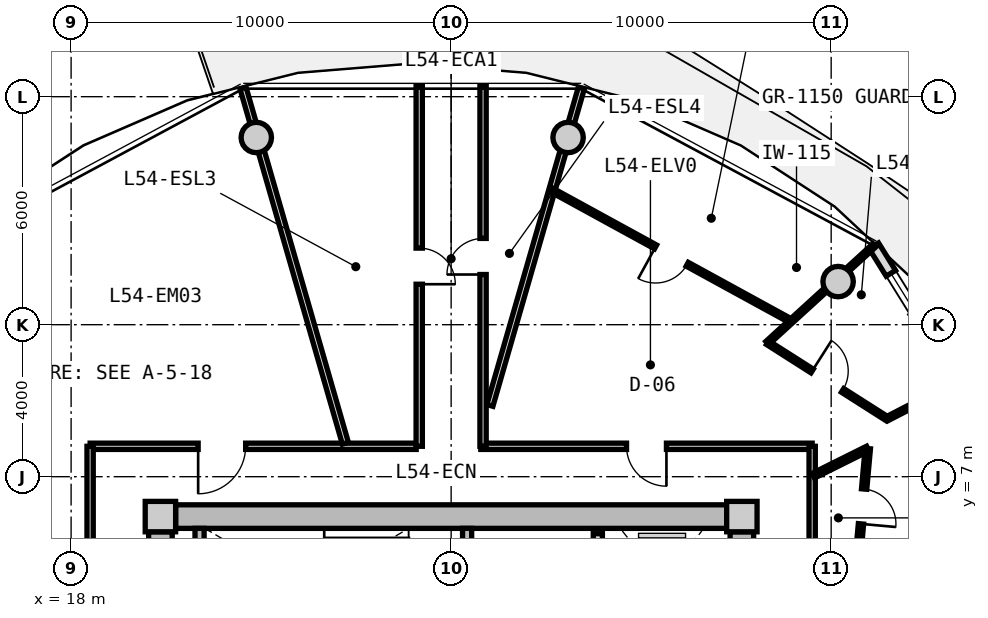
"""IFC4 building model, lengths in metres.
Left out: names, types, materials, properties, quantities, classifications, styles, units other than length and angle.
Written with IfcOpenShell. Run it as: python <this file> out.ifc"""

import sys

from ifc_helpers import new_model, si_unit, direction, frame, frame_2d, origin, origin_2d, place, context, subcontext, project, spatial, rectangle, circle, extrude, source, transform, mapped, element, fill, save


model = new_model("IFC4")
c1 = context("Model", 3, precision=1e-05, world=origin(), true_north=direction((0.0, 1.0)))
c2 = subcontext(c1, "Body", "Model", "MODEL_VIEW")
j1 = project(units=[si_unit("LENGTHUNIT", "METRE"), si_unit("PLANEANGLEUNIT", "RADIAN")], contexts=[c1])
p1 = place(None, origin())
s1 = spatial("IfcSite", under=j1, at=p1, CompositionType="ELEMENT")
p2 = place(p1, origin())
s2 = spatial("IfcBuilding", under=s1, at=p2, CompositionType="ELEMENT")
p3 = place(p2, frame((0.0, 0.0, 173.95)))
s3 = spatial("IfcBuildingStorey", under=s2, at=p3, CompositionType="ELEMENT", Elevation=173.95)
m1 = source(origin(), c2, "Body", "SweptSolid", [
    extrude(rectangle(XDim=0.8, YDim=0.8, at=origin_2d()), origin(), (0.0, 0.0, 1.0), 3.05),
])
for number, where, z_axis, x_axis in (
    (1, (35.65, 5.95, 0.0), (0.0, 0.0, 1.0), (1.0, 0.0, 0.0)),
    (2, (20.35, 5.95, 0.0), (0.0, 0.0, 1.0), (1.0, 0.0, 0.0)),
):
    element("IfcColumn", number, at=place(p3, frame(where, z_axis=z_axis, x_axis=x_axis)), inside=s3, PredefinedType="COLUMN", context=c2, shape_type="MappedRepresentation", body=[
        mapped(m1, transform((0.0, 0.0, 0.0), x_axis=(1.0, 0.0, 0.0), y_axis=(0.0, 1.0, 0.0), z_axis=(0.0, 0.0, 1.0), scale=1.0)),
    ])
m2 = source(origin(), c2, "Body", "SweptSolid", [
    extrude(rectangle(XDim=14.5, YDim=0.62, at=frame_2d((7.25, 0.0))), origin(), (0.0, 0.0, 1.0), 2.81),
])
p4 = place(p3, frame((20.75, 5.95, 0.0), z_axis=(0.0, 0.0, 1.0), x_axis=(1.0, 0.0, 0.0)))
e3 = element("IfcWall", 3, at=p4, inside=s3, PredefinedType="SHEAR", context=c2, shape_type="MappedRepresentation", body=[
    mapped(m2, transform((0.0, 0.0, 0.0), x_axis=(1.0, 0.0, 0.0), y_axis=(0.0, 1.0, 0.0), z_axis=(0.0, 0.0, 1.0), scale=1.0)),
])
m3 = source(origin(), c2, "Body", "SweptSolid", [
    extrude(rectangle(XDim=11.1, YDim=0.62, at=frame_2d((5.55, 0.0))), origin(), (0.0, 0.0, 1.0), 2.81),
])
p5 = place(p3, frame((20.35, -5.55, 0.0), z_axis=(0.0, 0.0, 1.0), x_axis=(0.0, 1.0, 0.0)))
e4 = element("IfcWall", 4, at=p5, inside=s3, PredefinedType="SHEAR", context=c2, shape_type="MappedRepresentation", body=[
    mapped(m3, transform((0.0, 0.0, 0.0), x_axis=(1.0, 0.0, 0.0), y_axis=(0.0, 1.0, 0.0), z_axis=(0.0, 0.0, 1.0), scale=1.0)),
])
p6 = place(p5, frame((3.8, 0.0, 0.0)))
e5 = element("IfcOpeningElement", 5, at=p6, cuts=e4, PredefinedType="OPENING", context=c2, shape_type="SweptSolid", body=[
    extrude(rectangle(XDim=1.2, YDim=2.15, at=frame_2d((0.6, 1.075))), frame((0.0, 0.32, 0.0), z_axis=(0.0, -1.0, 0.0), x_axis=(1.0, 0.0, 0.0)), (0.0, 0.0, 1.0), 0.64),
])
p7 = place(p3, frame((35.65, 5.55, 0.0), z_axis=(0.0, 0.0, 1.0), x_axis=(0.0, -1.0, 0.0)))
e6 = element("IfcWall", 6, at=p7, inside=s3, PredefinedType="SHEAR", context=c2, shape_type="MappedRepresentation", body=[
    mapped(m3, transform((0.0, 0.0, 0.0), x_axis=(1.0, 0.0, 0.0), y_axis=(0.0, 1.0, 0.0), z_axis=(0.0, 0.0, 1.0), scale=1.0)),
])
p8 = place(p7, frame((5.65, 0.0, 0.0)))
e7 = element("IfcOpeningElement", 7, at=p8, cuts=e6, PredefinedType="OPENING", context=c2, shape_type="SweptSolid", body=[
    extrude(rectangle(XDim=1.2, YDim=2.15, at=frame_2d((0.6, 1.075))), frame((0.0, 0.32, 0.0), z_axis=(0.0, -1.0, 0.0), x_axis=(1.0, 0.0, 0.0)), (0.0, 0.0, 1.0), 0.64),
])
m4 = source(origin(), c2, "Body", "SweptSolid", [
    extrude(circle(Radius=0.4, at=origin_2d()), origin(), (0.0, 0.0, 1.0), 3.05),
])
for number, where, z_axis, x_axis in (
    (8, (38.183, 12.135, 0.0), (0.0, 0.0, 1.0), (1.0, 0.0, 0.0)),
    (9, (31.077, 15.926, 0.0), (0.0, 0.0, 1.0), (1.0, 0.0, 0.0)),
    (10, (22.873, 15.926, 0.0), (0.0, 0.0, 1.0), (1.0, 0.0, 0.0)),
):
    element("IfcColumn", number, at=place(p3, frame(where, z_axis=z_axis, x_axis=x_axis)), inside=s3, PredefinedType="COLUMN", context=c2, shape_type="MappedRepresentation", body=[
        mapped(m4, transform((0.0, 0.0, 0.0), x_axis=(1.0, 0.0, 0.0), y_axis=(0.0, 1.0, 0.0), z_axis=(0.0, 0.0, 1.0), scale=1.0)),
    ])
m5 = source(origin(), c2, "Body", "SweptSolid", [
    extrude(rectangle(XDim=8.431, YDim=0.29, at=frame_2d((4.216, 0.0))), origin(), (0.0, 0.0, 1.0), 2.81),
])
p9 = place(p3, frame((39.123, 13.075, 0.0), z_axis=(0.0, 0.0, 1.0), x_axis=(0.527377998418, -0.849630770855, 0.0)))
e11 = element("IfcWall", 11, at=p9, inside=s3, PredefinedType="SOLIDWALL", context=c2, shape_type="MappedRepresentation", body=[
    mapped(m5, transform((0.0, 0.0, 0.0), x_axis=(1.0, 0.0, 0.0), y_axis=(0.0, 1.0, 0.0), z_axis=(0.0, 0.0, 1.0), scale=1.0)),
])
p10 = place(p9, frame((6.34, 0.0, 0.0)))
e12 = element("IfcOpeningElement", 12, at=p10, cuts=e11, PredefinedType="OPENING", context=c2, shape_type="SweptSolid", body=[
    extrude(rectangle(XDim=1.15, YDim=2.25, at=frame_2d((0.575, 1.125))), frame((0.0, 0.155, 0.0), z_axis=(0.0, -1.0, 0.0), x_axis=(1.0, 0.0, 0.0)), (0.0, 0.0, 1.0), 0.31),
])
p11 = place(p9, frame((0.85, 0.0, 0.85)))
e13 = element("IfcOpeningElement", 13, at=p11, cuts=e11, PredefinedType="OPENING", context=c2, shape_type="SweptSolid", body=[
    extrude(rectangle(XDim=1.2, YDim=1.5, at=frame_2d((0.6, 0.75))), frame((0.0, 0.155, 0.0), z_axis=(0.0, -1.0, 0.0), x_axis=(1.0, 0.0, 0.0)), (0.0, 0.0, 1.0), 0.31),
])
m6 = source(origin(), c2, "Body", "SweptSolid", [
    extrude(rectangle(XDim=3.19, YDim=0.24, at=frame_2d((1.595, 0.0))), origin(), (0.0, 0.0, 1.0), 2.81),
])
p12 = place(p3, frame((21.38, 2.45, 0.0), z_axis=(0.0, 0.0, 1.0), x_axis=(0.0, 1.0, 0.0)))
e14 = element("IfcWall", 14, at=p12, inside=s3, PredefinedType="PARTITIONING", context=c2, shape_type="MappedRepresentation", body=[
    mapped(m6, transform((0.0, 0.0, 0.0), x_axis=(1.0, 0.0, 0.0), y_axis=(0.0, 1.0, 0.0), z_axis=(0.0, 0.0, 1.0), scale=1.0)),
])
p13 = place(p3, frame((28.42, 2.45, 0.0), z_axis=(0.0, 0.0, 1.0), x_axis=(0.0, 1.0, 0.0)))
e15 = element("IfcWall", 15, at=p13, inside=s3, PredefinedType="PARTITIONING", context=c2, shape_type="MappedRepresentation", body=[
    mapped(m6, transform((0.0, 0.0, 0.0), x_axis=(1.0, 0.0, 0.0), y_axis=(0.0, 1.0, 0.0), z_axis=(0.0, 0.0, 1.0), scale=1.0)),
])
p14 = place(p13, frame((0.55, 0.0, 0.0)))
e16 = element("IfcOpeningElement", 16, at=p14, cuts=e15, PredefinedType="OPENING", context=c2, shape_type="SweptSolid", body=[
    extrude(rectangle(XDim=1.1, YDim=2.15, at=frame_2d((0.55, 1.075))), frame((0.0, 0.13, 0.0), z_axis=(0.0, -1.0, 0.0), x_axis=(1.0, 0.0, 0.0)), (0.0, 0.0, 1.0), 0.26),
])
m7 = source(origin(), c2, "Body", "SweptSolid", [
    extrude(rectangle(XDim=5.0, YDim=0.24, at=frame_2d((2.5, 0.0))), origin(), (0.0, 0.0, 1.0), 2.795),
])
p15 = place(p3, frame((31.86, 0.5, 0.0), z_axis=(0.0, 0.0, 1.0), x_axis=(0.0, 1.0, 0.0)))
e17 = element("IfcWall", 17, at=p15, inside=s3, PredefinedType="PARTITIONING", context=c2, shape_type="MappedRepresentation", body=[
    mapped(m7, transform((0.0, 0.0, 0.0), x_axis=(1.0, 0.0, 0.0), y_axis=(0.0, 1.0, 0.0), z_axis=(0.0, 0.0, 1.0), scale=1.0)),
])
p16 = place(p15, frame((3.05, 0.0, 0.0)))
e18 = element("IfcOpeningElement", 18, at=p16, cuts=e17, PredefinedType="OPENING", context=c2, shape_type="SweptSolid", body=[
    extrude(rectangle(XDim=1.3, YDim=2.2, at=frame_2d((0.65, 1.1))), frame((0.0, 0.13, 0.0), z_axis=(0.0, -1.0, 0.0), x_axis=(1.0, 0.0, 0.0)), (0.0, 0.0, 1.0), 0.26),
])
p17 = place(p15, frame((0.55, 0.0, 0.0)))
e19 = element("IfcOpeningElement", 19, at=p17, cuts=e17, PredefinedType="OPENING", context=c2, shape_type="SweptSolid", body=[
    extrude(rectangle(XDim=1.3, YDim=2.2, at=frame_2d((0.65, 1.1))), frame((0.0, 0.13, 0.0), z_axis=(0.0, -1.0, 0.0), x_axis=(1.0, 0.0, 0.0)), (0.0, 0.0, 1.0), 0.26),
])
m8 = source(origin(), c2, "Body", "SweptSolid", [
    extrude(rectangle(XDim=8.58, YDim=0.165, at=frame_2d((4.29, 0.0))), origin(), (0.0, 0.0, 1.0), 2.795),
])
p18 = place(p3, frame((18.5, 7.8, 0.0), z_axis=(0.0, 0.0, 1.0), x_axis=(1.0, 0.0, 0.0)))
e20 = element("IfcWall", 20, at=p18, inside=s3, PredefinedType="PARTITIONING", context=c2, shape_type="MappedRepresentation", body=[
    mapped(m8, transform((0.0, 0.0, 0.0), x_axis=(1.0, 0.0, 0.0), y_axis=(0.0, 1.0, 0.0), z_axis=(0.0, 0.0, 1.0), scale=1.0)),
])
p19 = place(p18, frame((2.843, 0.0, 0.0)))
e21 = element("IfcOpeningElement", 21, at=p19, cuts=e20, PredefinedType="OPENING", context=c2, shape_type="SweptSolid", body=[
    extrude(rectangle(XDim=1.25, YDim=2.2, at=frame_2d((0.625, 1.1))), frame((0.0, 0.093, 0.0), z_axis=(0.0, -1.0, 0.0), x_axis=(1.0, 0.0, 0.0)), (0.0, 0.0, 1.0), 0.185),
])
m9 = source(origin(), c2, "Body", "SweptSolid", [
    extrude(rectangle(XDim=8.719, YDim=0.165, at=frame_2d((4.36, 0.0))), origin(), (0.0, 0.0, 1.0), 2.795),
])
p20 = place(p3, frame((28.781, 7.8, 0.0), z_axis=(0.0, 0.0, 1.0), x_axis=(1.0, 0.0, 0.0)))
e22 = element("IfcWall", 22, at=p20, inside=s3, PredefinedType="PARTITIONING", context=c2, shape_type="MappedRepresentation", body=[
    mapped(m9, transform((0.0, 0.0, 0.0), x_axis=(1.0, 0.0, 0.0), y_axis=(0.0, 1.0, 0.0), z_axis=(0.0, 0.0, 1.0), scale=1.0)),
])
p21 = place(p20, frame((3.835, 0.0, 0.0)))
e23 = element("IfcOpeningElement", 23, at=p21, cuts=e22, PredefinedType="OPENING", context=c2, shape_type="SweptSolid", body=[
    extrude(rectangle(XDim=1.05, YDim=2.15, at=frame_2d((0.525, 1.075))), frame((0.0, 0.093, 0.0), z_axis=(0.0, -1.0, 0.0), x_axis=(1.0, 0.0, 0.0)), (0.0, 0.0, 1.0), 0.185),
])
m10 = source(origin(), c2, "Body", "SweptSolid", [
    extrude(rectangle(XDim=6.88, YDim=0.165, at=frame_2d((3.44, 0.0))), origin(), (0.0, 0.0, 1.0), 2.795),
])
for number, where, z_axis, x_axis in (
    (24, (18.5, 0.92, 0.0), (0.0, 0.0, 1.0), (0.0, 1.0, 0.0)),
    (25, (37.5, 7.8, 0.0), (0.0, 0.0, 1.0), (0.0, -1.0, 0.0)),
):
    element("IfcWall", number, at=place(p3, frame(where, z_axis=z_axis, x_axis=x_axis)), inside=s3, PredefinedType="PARTITIONING", context=c2, shape_type="MappedRepresentation", body=[
        mapped(m10, transform((0.0, 0.0, 0.0), x_axis=(1.0, 0.0, 0.0), y_axis=(0.0, 1.0, 0.0), z_axis=(0.0, 0.0, 1.0), scale=1.0)),
    ])
m11 = source(origin(), c2, "Body", "SweptSolid", [
    extrude(rectangle(XDim=8.695, YDim=0.165, at=frame_2d((4.348, 0.0))), origin(), (0.0, 0.0, 1.0), 2.345),
])
p22 = place(p3, frame((29.02, 8.875, 0.0), z_axis=(0.0, 0.0, 1.0), x_axis=(0.276797231892, 0.960928349263, 0.0)))
e26 = element("IfcWall", 26, at=p22, inside=s3, PredefinedType="PARTITIONING", context=c2, shape_type="MappedRepresentation", body=[
    mapped(m11, transform((0.0, 0.0, 0.0), x_axis=(1.0, 0.0, 0.0), y_axis=(0.0, 1.0, 0.0), z_axis=(0.0, 0.0, 1.0), scale=1.0)),
])
m12 = source(origin(), c2, "Body", "SweptSolid", [
    extrude(rectangle(XDim=9.73, YDim=0.165, at=frame_2d((4.865, 0.0))), origin(), (0.0, 0.0, 1.0), 2.345),
])
p23 = place(p3, frame((25.217, 7.88, 0.0), z_axis=(0.0, 0.0, 1.0), x_axis=(-0.27679492614, 0.960929013436, 0.0)))
e27 = element("IfcWall", 27, at=p23, inside=s3, PredefinedType="PARTITIONING", context=c2, shape_type="MappedRepresentation", body=[
    mapped(m12, transform((0.0, 0.0, 0.0), x_axis=(1.0, 0.0, 0.0), y_axis=(0.0, 1.0, 0.0), z_axis=(0.0, 0.0, 1.0), scale=1.0)),
])
m13 = source(origin(), c2, "Body", "SweptSolid", [
    extrude(rectangle(XDim=8.305, YDim=0.165, at=frame_2d((4.153, 0.0))), origin(), (0.0, 0.0, 1.0), 2.345),
])
p24 = place(p3, frame((18.42, 3.908, 0.0), z_axis=(0.0, 0.0, 1.0), x_axis=(-0.970309994378, 0.241864662175, 0.0)))
e28 = element("IfcWall", 28, at=p24, inside=s3, PredefinedType="PARTITIONING", context=c2, shape_type="MappedRepresentation", body=[
    mapped(m13, transform((0.0, 0.0, 0.0), x_axis=(1.0, 0.0, 0.0), y_axis=(0.0, 1.0, 0.0), z_axis=(0.0, 0.0, 1.0), scale=1.0)),
])
m14 = source(origin(), c2, "Body", "SweptSolid", [
    extrude(rectangle(XDim=6.193, YDim=0.165, at=frame_2d((3.096, 0.0))), origin(), (0.0, 0.0, 1.0), 2.345),
])
p25 = place(p3, frame((37.58, 4.419, 0.0), z_axis=(0.0, 0.0, 1.0), x_axis=(0.970309243466, 0.241867674657, 0.0)))
e29 = element("IfcWall", 29, at=p25, inside=s3, PredefinedType="PARTITIONING", context=c2, shape_type="MappedRepresentation", body=[
    mapped(m14, transform((0.0, 0.0, 0.0), x_axis=(1.0, 0.0, 0.0), y_axis=(0.0, 1.0, 0.0), z_axis=(0.0, 0.0, 1.0), scale=1.0)),
])
m15 = source(origin(), c2, "Body", "SweptSolid", [
    extrude(rectangle(XDim=9.48, YDim=0.165, at=frame_2d((4.74, 0.0))), origin(), (0.0, 0.0, 1.0), 2.795),
])
p26 = place(p3, frame((27.16, 7.8, 0.0), z_axis=(0.0, 0.0, 1.0), x_axis=(0.0, 1.0, 0.0)))
e30 = element("IfcWall", 30, at=p26, inside=s3, PredefinedType="PARTITIONING", context=c2, shape_type="MappedRepresentation", body=[
    mapped(m15, transform((0.0, 0.0, 0.0), x_axis=(1.0, 0.0, 0.0), y_axis=(0.0, 1.0, 0.0), z_axis=(0.0, 0.0, 1.0), scale=1.0)),
])
p27 = place(p26, frame((4.265, 0.0, 0.0)))
e31 = element("IfcOpeningElement", 31, at=p27, cuts=e30, PredefinedType="OPENING", context=c2, shape_type="SweptSolid", body=[
    extrude(rectangle(XDim=0.95, YDim=2.1, at=frame_2d((0.475, 1.05))), frame((0.0, 0.093, 0.0), z_axis=(0.0, -1.0, 0.0), x_axis=(1.0, 0.0, 0.0)), (0.0, 0.0, 1.0), 0.185),
])
p28 = place(p3, frame((28.84, 17.28, 0.0), z_axis=(0.0, 0.0, 1.0), x_axis=(0.0, -1.0, 0.0)))
e32 = element("IfcWall", 32, at=p28, inside=s3, PredefinedType="PARTITIONING", context=c2, shape_type="MappedRepresentation", body=[
    mapped(m15, transform((0.0, 0.0, 0.0), x_axis=(1.0, 0.0, 0.0), y_axis=(0.0, 1.0, 0.0), z_axis=(0.0, 0.0, 1.0), scale=1.0)),
])
p29 = place(p28, frame((4.01, 0.0, 0.0)))
e33 = element("IfcOpeningElement", 33, at=p29, cuts=e32, PredefinedType="OPENING", context=c2, shape_type="SweptSolid", body=[
    extrude(rectangle(XDim=0.95, YDim=2.1, at=frame_2d((0.475, 1.05))), frame((0.0, 0.093, 0.0), z_axis=(0.0, -1.0, 0.0), x_axis=(1.0, 0.0, 0.0)), (0.0, 0.0, 1.0), 0.185),
])
m16 = source(origin(), c2, "Body", "SweptSolid", [
    extrude(rectangle(XDim=7.167, YDim=0.115, at=frame_2d((3.583, 0.0))), origin(), (0.0, 0.0, 1.0), 2.795),
])
p30 = place(p3, frame((36.939, 11.098, 0.0), z_axis=(0.0, 0.0, 1.0), x_axis=(-0.8771628907, 0.480192943699, 0.0)))
e34 = element("IfcWall", 34, at=p30, inside=s3, PredefinedType="PARTITIONING", context=c2, shape_type="MappedRepresentation", body=[
    mapped(m16, transform((0.0, 0.0, 0.0), x_axis=(1.0, 0.0, 0.0), y_axis=(0.0, 1.0, 0.0), z_axis=(0.0, 0.0, 1.0), scale=1.0)),
])
p31 = place(p30, frame((3.108, 0.0, 0.0)))
e35 = element("IfcOpeningElement", 35, at=p31, cuts=e34, PredefinedType="OPENING", context=c2, shape_type="SweptSolid", body=[
    extrude(rectangle(XDim=0.95, YDim=2.1, at=frame_2d((0.475, 1.05))), frame((0.0, 0.067, 0.0), z_axis=(0.0, -1.0, 0.0), x_axis=(1.0, 0.0, 0.0)), (0.0, 0.0, 1.0), 0.135),
])
m17 = source(origin(), c2, "Body", "SweptSolid", [
    extrude(rectangle(XDim=3.814, YDim=0.115, at=frame_2d((1.907, 0.0))), origin(), (0.0, 0.0, 1.0), 2.345),
])
p32 = place(p3, frame((36.319, 10.518, 0.0), z_axis=(0.0, 0.0, 1.0), x_axis=(0.73871962024, 0.674012850524, 0.0)))
e36 = element("IfcWall", 36, at=p32, inside=s3, PredefinedType="PARTITIONING", context=c2, shape_type="MappedRepresentation", body=[
    mapped(m17, transform((0.0, 0.0, 0.0), x_axis=(1.0, 0.0, 0.0), y_axis=(0.0, 1.0, 0.0), z_axis=(0.0, 0.0, 1.0), scale=1.0)),
])
m18 = source(origin(), c2, "Body", "SweptSolid", [
    extrude(rectangle(XDim=1.601, YDim=0.14, at=frame_2d((0.801, 0.0))), origin(), (0.0, 0.0, 1.0), 2.795),
])
p33 = place(p3, frame((37.53, 7.026, 0.0), z_axis=(0.0, 0.0, 1.0), x_axis=(0.895279369592, 0.445505163138, 0.0)))
e37 = element("IfcWall", 37, at=p33, inside=s3, PredefinedType="PARTITIONING", context=c2, shape_type="MappedRepresentation", body=[
    mapped(m18, transform((0.0, 0.0, 0.0), x_axis=(1.0, 0.0, 0.0), y_axis=(0.0, 1.0, 0.0), z_axis=(0.0, 0.0, 1.0), scale=1.0)),
])
m19 = source(origin(), c2, "Body", "SweptSolid", [
    extrude(rectangle(XDim=3.058, YDim=0.14, at=frame_2d((1.529, 0.0))), origin(), (0.0, 0.0, 1.0), 2.795),
])
p34 = place(p3, frame((38.964, 7.74, 0.0), z_axis=(0.0, 0.0, 1.0), x_axis=(-0.090060616512, -0.99593628579, 0.0)))
e38 = element("IfcWall", 38, at=p34, inside=s3, PredefinedType="PARTITIONING", context=c2, shape_type="MappedRepresentation", body=[
    mapped(m19, transform((0.0, 0.0, 0.0), x_axis=(1.0, 0.0, 0.0), y_axis=(0.0, 1.0, 0.0), z_axis=(0.0, 0.0, 1.0), scale=1.0)),
])
p35 = place(p34, frame((1.069, 0.0, 0.0)))
e39 = element("IfcOpeningElement", 39, at=p35, cuts=e38, PredefinedType="OPENING", context=c2, shape_type="SweptSolid", body=[
    extrude(rectangle(XDim=0.92, YDim=2.1, at=frame_2d((0.46, 1.05))), frame((0.0, 0.08, 0.0), z_axis=(0.0, -1.0, 0.0), x_axis=(1.0, 0.0, 0.0)), (0.0, 0.0, 1.0), 0.16),
])
m20 = source(origin(), c2, "Body", "SweptSolid", [
    extrude(rectangle(XDim=2.13, YDim=0.115, at=frame_2d((1.065, 0.0))), origin(), (0.0, 0.0, 1.0), 2.795),
])
p36 = place(p3, frame((39.471, 8.525, 0.0), z_axis=(0.0, 0.0, 1.0), x_axis=(0.888504584778, 0.458867740016, 0.0)))
e40 = element("IfcWall", 40, at=p36, inside=s3, PredefinedType="PARTITIONING", context=c2, shape_type="MappedRepresentation", body=[
    mapped(m20, transform((0.0, 0.0, 0.0), x_axis=(1.0, 0.0, 0.0), y_axis=(0.0, 1.0, 0.0), z_axis=(0.0, 0.0, 1.0), scale=1.0)),
])
m21 = source(origin(), c2, "Body", "SweptSolid", [
    extrude(rectangle(XDim=3.725, YDim=0.115, at=frame_2d((1.863, 0.0))), origin(), (0.0, 0.0, 1.0), 2.795),
])
p37 = place(p3, frame((39.471, 8.525, 0.0), z_axis=(0.0, 0.0, 1.0), x_axis=(-0.843453635564, 0.537201977523, 0.0)))
e41 = element("IfcWall", 41, at=p37, inside=s3, PredefinedType="PARTITIONING", context=c2, shape_type="MappedRepresentation", body=[
    mapped(m21, transform((0.0, 0.0, 0.0), x_axis=(1.0, 0.0, 0.0), y_axis=(0.0, 1.0, 0.0), z_axis=(0.0, 0.0, 1.0), scale=1.0)),
])
p38 = place(p37, frame((1.388, 0.0, 0.0)))
e42 = element("IfcOpeningElement", 42, at=p38, cuts=e41, PredefinedType="OPENING", context=c2, shape_type="SweptSolid", body=[
    extrude(rectangle(XDim=0.95, YDim=2.1, at=frame_2d((0.475, 1.05))), frame((0.0, 0.067, 0.0), z_axis=(0.0, -1.0, 0.0), x_axis=(1.0, 0.0, 0.0)), (0.0, 0.0, 1.0), 0.135),
])
m22 = source(origin(), c2, "Body", "SweptSolid", [
    extrude(rectangle(XDim=1.2, YDim=1.5, at=frame_2d((0.6, 0.75))), frame((0.0, 0.03, 0.0), z_axis=(0.0, -1.0, 0.0), x_axis=(1.0, 0.0, 0.0)), (0.0, 0.0, 1.0), 0.06),
])
p39 = place(p11, origin())
e43 = element("IfcWindow", 43, at=p39, inside=s3, PartitioningType="SINGLE_PANEL", PredefinedType="WINDOW", context=c2, shape_type="MappedRepresentation", body=[
    mapped(m22, transform((0.0, 0.0, 0.0), x_axis=(1.0, 0.0, 0.0), y_axis=(0.0, 1.0, 0.0), z_axis=(0.0, 0.0, 1.0), scale=1.0)),
])
fill(e13, e43)
m23 = source(origin(), c2, "Body", "SweptSolid", [
    extrude(rectangle(XDim=0.95, YDim=2.1, at=frame_2d((0.475, 1.05))), frame((0.0, 0.025, 0.0), z_axis=(0.0, -1.0, 0.0), x_axis=(1.0, 0.0, 0.0)), (0.0, 0.0, 1.0), 0.05),
])
p40 = place(p27, frame((0.95, 0.0, 0.0), z_axis=(0.0, 0.0, 1.0), x_axis=(-1.0, 0.0, 0.0)))
e44 = element("IfcDoor", 44, at=p40, inside=s3, OperationType="SINGLE_SWING_RIGHT", PredefinedType="DOOR", context=c2, shape_type="MappedRepresentation", body=[
    mapped(m23, transform((0.0, 0.0, 0.0), x_axis=(1.0, 0.0, 0.0), y_axis=(0.0, 1.0, 0.0), z_axis=(0.0, 0.0, 1.0), scale=1.0)),
])
fill(e31, e44)
p41 = place(p29, frame((0.95, 0.0, 0.0), z_axis=(0.0, 0.0, 1.0), x_axis=(-1.0, 0.0, 0.0)))
e45 = element("IfcDoor", 45, at=p41, inside=s3, OperationType="SINGLE_SWING_LEFT", PredefinedType="DOOR", context=c2, shape_type="MappedRepresentation", body=[
    mapped(m23, transform((0.0, 0.0, 0.0), x_axis=(1.0, 0.0, 0.0), y_axis=(0.0, 1.0, 0.0), z_axis=(0.0, 0.0, 1.0), scale=1.0)),
])
fill(e33, e45)
m24 = source(origin(), c2, "Body", "SweptSolid", [
    extrude(rectangle(XDim=1.05, YDim=2.15, at=frame_2d((0.525, 1.075))), frame((0.0, 0.025, 0.0), z_axis=(0.0, -1.0, 0.0), x_axis=(1.0, 0.0, 0.0)), (0.0, 0.0, 1.0), 0.05),
])
p42 = place(p21, frame((1.05, 0.0, 0.0), z_axis=(0.0, 0.0, 1.0), x_axis=(-1.0, 0.0, 0.0)))
e46 = element("IfcDoor", 46, at=p42, inside=s3, OperationType="SINGLE_SWING_LEFT", PredefinedType="DOOR", context=c2, shape_type="MappedRepresentation", body=[
    mapped(m24, transform((0.0, 0.0, 0.0), x_axis=(1.0, 0.0, 0.0), y_axis=(0.0, 1.0, 0.0), z_axis=(0.0, 0.0, 1.0), scale=1.0)),
])
fill(e23, e46)
m25 = source(origin(), c2, "Body", "SweptSolid", [
    extrude(rectangle(XDim=0.92, YDim=2.1, at=frame_2d((0.46, 1.05))), frame((0.0, 0.025, 0.0), z_axis=(0.0, -1.0, 0.0), x_axis=(1.0, 0.0, 0.0)), (0.0, 0.0, 1.0), 0.05),
])
p43 = place(p35, origin())
e47 = element("IfcDoor", 47, at=p43, inside=s3, OperationType="SINGLE_SWING_RIGHT", PredefinedType="DOOR", context=c2, shape_type="MappedRepresentation", body=[
    mapped(m25, transform((0.0, 0.0, 0.0), x_axis=(1.0, 0.0, 0.0), y_axis=(0.0, 1.0, 0.0), z_axis=(0.0, 0.0, 1.0), scale=1.0)),
])
fill(e39, e47)
p44 = place(p38, frame((0.95, 0.0, 0.0), z_axis=(0.0, 0.0, 1.0), x_axis=(-1.0, 0.0, 0.0)))
e48 = element("IfcDoor", 48, at=p44, inside=s3, OperationType="SINGLE_SWING_LEFT", PredefinedType="DOOR", context=c2, shape_type="MappedRepresentation", body=[
    mapped(m23, transform((0.0, 0.0, 0.0), x_axis=(1.0, 0.0, 0.0), y_axis=(0.0, 1.0, 0.0), z_axis=(0.0, 0.0, 1.0), scale=1.0)),
])
fill(e42, e48)
p45 = place(p31, origin())
e49 = element("IfcDoor", 49, at=p45, inside=s3, OperationType="SINGLE_SWING_RIGHT", PredefinedType="DOOR", context=c2, shape_type="MappedRepresentation", body=[
    mapped(m23, transform((0.0, 0.0, 0.0), x_axis=(1.0, 0.0, 0.0), y_axis=(0.0, 1.0, 0.0), z_axis=(0.0, 0.0, 1.0), scale=1.0)),
])
fill(e35, e49)
m26 = source(origin(), c2, "Body", "SweptSolid", [
    extrude(rectangle(XDim=1.25, YDim=2.2, at=frame_2d((0.625, 1.1))), frame((0.0, 0.025, 0.0), z_axis=(0.0, -1.0, 0.0), x_axis=(1.0, 0.0, 0.0)), (0.0, 0.0, 1.0), 0.05),
])
p46 = place(p19, frame((1.25, 0.0, 0.0), z_axis=(0.0, 0.0, 1.0), x_axis=(-1.0, 0.0, 0.0)))
e50 = element("IfcDoor", 50, at=p46, inside=s3, OperationType="SINGLE_SWING_RIGHT", PredefinedType="DOOR", context=c2, shape_type="MappedRepresentation", body=[
    mapped(m26, transform((0.0, 0.0, 0.0), x_axis=(1.0, 0.0, 0.0), y_axis=(0.0, 1.0, 0.0), z_axis=(0.0, 0.0, 1.0), scale=1.0)),
])
fill(e21, e50)
save(model, sys.argv[1])
